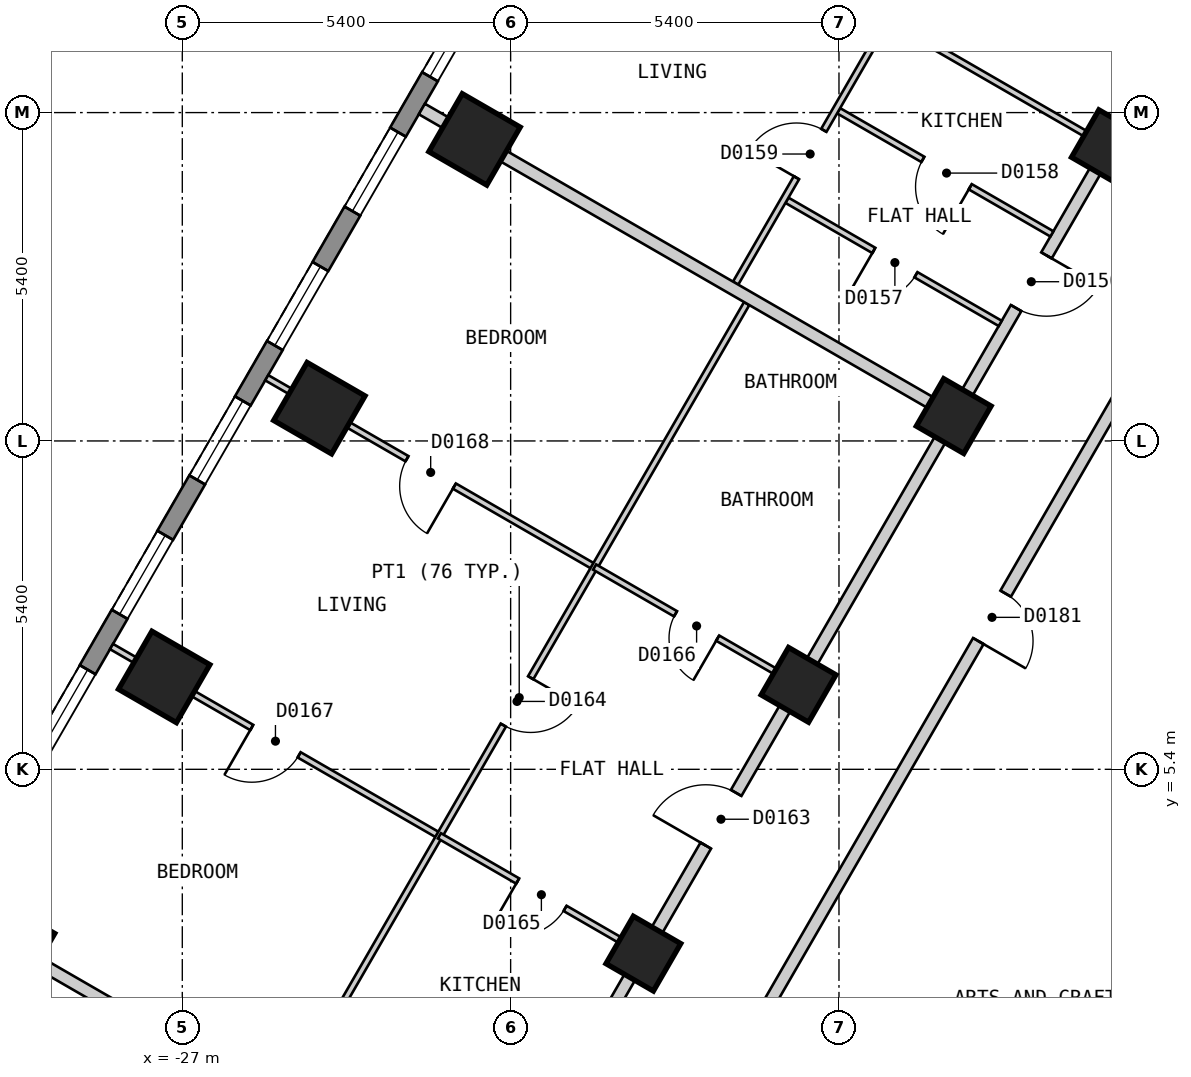
"""IFC4 building model, lengths in metres.
Left out: names, types, materials, properties, quantities, classifications, styles, units other than length and angle.
Written with IfcOpenShell. Run it as: python <this file> out.ifc"""

import sys

from ifc_helpers import new_model, si_unit, direction, frame, frame_2d, origin, origin_2d, place, context, subcontext, project, spatial, polyline, rectangle, outline, extrude, element, fill, save


model = new_model("IFC4")
c1 = context("Model", 3, precision=1e-05, world=origin(), true_north=direction((0.0, 1.0)))
c2 = subcontext(c1, "Body", "Model", "MODEL_VIEW")
j1 = project(units=[si_unit("LENGTHUNIT", "METRE"), si_unit("PLANEANGLEUNIT", "RADIAN")], contexts=[c1])
p1 = place(None, origin())
s1 = spatial("IfcSite", under=j1, at=p1, CompositionType="ELEMENT")
p2 = place(p1, origin())
s2 = spatial("IfcBuilding", under=s1, at=p2, CompositionType="ELEMENT")
p3 = place(p2, frame((0.0, 0.0, 29.4)))
s3 = spatial("IfcBuildingStorey", under=s2, at=p3, CompositionType="ELEMENT", Elevation=29.4)
for number, where, z_axis, x_axis in (
    (1, (-22.194, 15.759, 0.0), (0.0, 0.0, 1.0), (-0.5, -0.866, 0.0)),
    (2, (-24.746, 11.339, 0.0), (0.0, 0.0, 1.0), (-0.5, -0.866, 0.0)),
    (3, (-27.298, 6.919, 0.0), (0.0, 0.0, 1.0), (-0.5, -0.866, 0.0)),
    (4, (-29.849, 2.499, 0.0), (0.0, 0.0, 1.0), (-0.5, -0.866, 0.0)),
):
    element("IfcColumn", number, at=place(p3, frame(where, z_axis=z_axis, x_axis=x_axis)), inside=s3, PredefinedType="COLUMN", context=c2, shape_type="SweptSolid", body=[
        extrude(rectangle(XDim=1.1, YDim=1.1, at=origin_2d()), origin(), (0.0, 0.0, 1.0), 3.0),
    ])
for number, where, z_axis, x_axis in (
    (5, (-11.761, 15.63, 0.0), (0.0, 0.0, 1.0), (-0.5, -0.866, 0.0)),
    (6, (-14.313, 11.209, 0.0), (0.0, 0.0, 1.0), (-0.5, -0.866, 0.0)),
    (7, (-16.865, 6.789, 0.0), (0.0, 0.0, 1.0), (-0.5, -0.866, 0.0)),
    (8, (-19.417, 2.369, 0.0), (0.0, 0.0, 1.0), (-0.5, -0.866, 0.0)),
):
    element("IfcColumn", number, at=place(p3, frame(where, z_axis=z_axis, x_axis=x_axis)), inside=s3, PredefinedType="COLUMN", context=c2, shape_type="SweptSolid", body=[
        extrude(rectangle(XDim=0.9, YDim=0.9, at=origin_2d()), origin(), (0.0, 0.0, 1.0), 3.0),
    ])
p4 = place(p3, frame((-17.71, 25.825, 0.0), z_axis=(0.0, 0.0, 1.0), x_axis=(-0.500001938803, -0.866024284413, 0.0)))
e9 = element("IfcWall", 9, at=p4, inside=s3, PredefinedType="SOLIDWALL", context=c2, shape_type="SweptSolid", body=[
    extrude(outline(polyline([(0.0, -0.15), (27.02, -0.15), (26.94, 0.15), (0.08, 0.15), (0.0, -0.15)])), origin(), (0.0, 0.0, 1.0), 2.7),
])
p5 = place(p4, frame((1.277, 0.0, 0.15)))
e10 = element("IfcOpeningElement", 10, at=p5, cuts=e9, PredefinedType="OPENING", context=c2, shape_type="SweptSolid", body=[
    extrude(rectangle(XDim=1.5, YDim=2.1, at=frame_2d((0.75, 1.05))), frame((0.0, 0.16, 0.0), z_axis=(0.0, -1.0, 0.0), x_axis=(1.0, 0.0, 0.0)), (0.0, 0.0, 1.0), 0.32),
])
p6 = place(p4, frame((3.829, 0.0, 0.15)))
e11 = element("IfcOpeningElement", 11, at=p6, cuts=e9, PredefinedType="OPENING", context=c2, shape_type="SweptSolid", body=[
    extrude(rectangle(XDim=1.5, YDim=2.1, at=frame_2d((0.75, 1.05))), frame((0.0, 0.16, 0.0), z_axis=(0.0, -1.0, 0.0), x_axis=(1.0, 0.0, 0.0)), (0.0, 0.0, 1.0), 0.32),
])
p7 = place(p4, frame((6.382, 0.0, 0.15)))
e12 = element("IfcOpeningElement", 12, at=p7, cuts=e9, PredefinedType="OPENING", context=c2, shape_type="SweptSolid", body=[
    extrude(rectangle(XDim=1.5, YDim=2.1, at=frame_2d((0.75, 1.05))), frame((0.0, 0.16, 0.0), z_axis=(0.0, -1.0, 0.0), x_axis=(1.0, 0.0, 0.0)), (0.0, 0.0, 1.0), 0.32),
])
p8 = place(p4, frame((8.933, 0.0, 0.15)))
e13 = element("IfcOpeningElement", 13, at=p8, cuts=e9, PredefinedType="OPENING", context=c2, shape_type="SweptSolid", body=[
    extrude(rectangle(XDim=1.5, YDim=2.1, at=frame_2d((0.75, 1.05))), frame((0.0, 0.16, 0.0), z_axis=(0.0, -1.0, 0.0), x_axis=(1.0, 0.0, 0.0)), (0.0, 0.0, 1.0), 0.32),
])
p9 = place(p4, frame((11.485, 0.0, 0.15)))
e14 = element("IfcOpeningElement", 14, at=p9, cuts=e9, PredefinedType="OPENING", context=c2, shape_type="SweptSolid", body=[
    extrude(rectangle(XDim=1.5, YDim=2.1, at=frame_2d((0.75, 1.05))), frame((0.0, 0.16, 0.0), z_axis=(0.0, -1.0, 0.0), x_axis=(1.0, 0.0, 0.0)), (0.0, 0.0, 1.0), 0.32),
])
p10 = place(p4, frame((14.037, 0.0, 0.15)))
e15 = element("IfcOpeningElement", 15, at=p10, cuts=e9, PredefinedType="OPENING", context=c2, shape_type="SweptSolid", body=[
    extrude(rectangle(XDim=1.5, YDim=2.1, at=frame_2d((0.75, 1.05))), frame((0.0, 0.16, 0.0), z_axis=(0.0, -1.0, 0.0), x_axis=(1.0, 0.0, 0.0)), (0.0, 0.0, 1.0), 0.32),
])
p11 = place(p4, frame((16.589, 0.0, 0.15)))
e16 = element("IfcOpeningElement", 16, at=p11, cuts=e9, PredefinedType="OPENING", context=c2, shape_type="SweptSolid", body=[
    extrude(rectangle(XDim=1.5, YDim=2.1, at=frame_2d((0.75, 1.05))), frame((0.0, 0.16, 0.0), z_axis=(0.0, -1.0, 0.0), x_axis=(1.0, 0.0, 0.0)), (0.0, 0.0, 1.0), 0.32),
])
p12 = place(p4, frame((19.141, 0.0, 0.15)))
e17 = element("IfcOpeningElement", 17, at=p12, cuts=e9, PredefinedType="OPENING", context=c2, shape_type="SweptSolid", body=[
    extrude(rectangle(XDim=1.5, YDim=2.1, at=frame_2d((0.75, 1.05))), frame((0.0, 0.16, 0.0), z_axis=(0.0, -1.0, 0.0), x_axis=(1.0, 0.0, 0.0)), (0.0, 0.0, 1.0), 0.32),
])
p13 = place(p4, frame((21.693, 0.0, 0.15)))
e18 = element("IfcOpeningElement", 18, at=p13, cuts=e9, PredefinedType="OPENING", context=c2, shape_type="SweptSolid", body=[
    extrude(rectangle(XDim=1.5, YDim=2.1, at=frame_2d((0.75, 1.05))), frame((0.0, 0.16, 0.0), z_axis=(0.0, -1.0, 0.0), x_axis=(1.0, 0.0, 0.0)), (0.0, 0.0, 1.0), 0.32),
])
p14 = place(p4, frame((24.244, 0.0, 0.15)))
e19 = element("IfcOpeningElement", 19, at=p14, cuts=e9, PredefinedType="OPENING", context=c2, shape_type="SweptSolid", body=[
    extrude(rectangle(XDim=1.5, YDim=2.1, at=frame_2d((0.75, 1.05))), frame((0.0, 0.16, 0.0), z_axis=(0.0, -1.0, 0.0), x_axis=(1.0, 0.0, 0.0)), (0.0, 0.0, 1.0), 0.32),
])
p15 = place(p3, frame((-18.244, -0.001, 0.0), z_axis=(0.0, 0.0, 1.0), x_axis=(0.499962999376, 0.866046765051, 0.0)))
e20 = element("IfcWall", 20, at=p15, inside=s3, PredefinedType="PARTITIONING", context=c2, shape_type="SweptSolid", body=[
    extrude(rectangle(XDim=18.245, YDim=0.2, at=frame_2d((9.123, 0.0))), origin(), (0.0, 0.0, 1.0), 2.7),
])
p16 = place(p15, frame((8.672, 0.0, 0.0)))
e21 = element("IfcOpeningElement", 21, at=p16, cuts=e20, PredefinedType="OPENING", context=c2, shape_type="SweptSolid", body=[
    extrude(rectangle(XDim=0.9, YDim=2.1, at=frame_2d((0.45, 1.05))), frame((0.0, 0.11, 0.0), z_axis=(0.0, -1.0, 0.0), x_axis=(1.0, 0.0, 0.0)), (0.0, 0.0, 1.0), 0.22),
])
p17 = place(p3, frame((-20.727, 0.099, 0.0), z_axis=(0.0, 0.0, 1.0), x_axis=(0.499993204491, 0.866029327138, 0.0)))
e22 = element("IfcWall", 22, at=p17, inside=s3, PredefinedType="PARTITIONING", context=c2, shape_type="SweptSolid", body=[
    extrude(rectangle(XDim=20.554, YDim=0.2, at=frame_2d((10.277, 0.0))), origin(), (0.0, 0.0, 1.0), 2.7),
])
p18 = place(p17, frame((14.88, 0.0, 0.0)))
e23 = element("IfcOpeningElement", 23, at=p18, cuts=e22, PredefinedType="OPENING", context=c2, shape_type="SweptSolid", body=[
    extrude(rectangle(XDim=1.0, YDim=2.1, at=frame_2d((0.5, 1.05))), frame((0.0, 0.11, 0.0), z_axis=(0.0, -1.0, 0.0), x_axis=(1.0, 0.0, 0.0)), (0.0, 0.0, 1.0), 0.22),
])
p19 = place(p17, frame((4.673, 0.0, 0.0)))
e24 = element("IfcOpeningElement", 24, at=p19, cuts=e22, PredefinedType="OPENING", context=c2, shape_type="SweptSolid", body=[
    extrude(rectangle(XDim=1.0, YDim=2.1, at=frame_2d((0.5, 1.05))), frame((0.0, 0.11, 0.0), z_axis=(0.0, -1.0, 0.0), x_axis=(1.0, 0.0, 0.0)), (0.0, 0.0, 1.0), 0.22),
])
p20 = place(p3, frame((-28.164, 7.419, 0.0), z_axis=(0.0, 0.0, 1.0), x_axis=(0.86607068519, -0.499921562103, 0.0)))
e25 = element("IfcWall", 25, at=p20, inside=s3, PredefinedType="PARTITIONING", context=c2, shape_type="SweptSolid", body=[
    extrude(rectangle(XDim=6.227, YDim=0.1, at=frame_2d((3.114, 0.0))), origin(), (0.0, 0.0, 1.0), 2.7),
])
p21 = place(p20, frame((2.663, 0.0, 0.0)))
e26 = element("IfcOpeningElement", 26, at=p21, cuts=e25, PredefinedType="OPENING", context=c2, shape_type="SweptSolid", body=[
    extrude(rectangle(XDim=0.9, YDim=2.1, at=frame_2d((0.45, 1.05))), frame((0.0, 0.06, 0.0), z_axis=(0.0, -1.0, 0.0), x_axis=(1.0, 0.0, 0.0)), (0.0, 0.0, 1.0), 0.12),
])
p22 = place(p3, frame((-25.611, 11.839, 0.0), z_axis=(0.0, 0.0, 1.0), x_axis=(0.866031483044, -0.499989470266, 0.0)))
e27 = element("IfcWall", 27, at=p22, inside=s3, PredefinedType="PARTITIONING", context=c2, shape_type="SweptSolid", body=[
    extrude(rectangle(XDim=6.226, YDim=0.1, at=frame_2d((3.113, 0.0))), origin(), (0.0, 0.0, 1.0), 2.7),
])
p23 = place(p22, frame((2.663, 0.0, 0.0)))
e28 = element("IfcOpeningElement", 28, at=p23, cuts=e27, PredefinedType="OPENING", context=c2, shape_type="SweptSolid", body=[
    extrude(rectangle(XDim=0.9, YDim=2.1, at=frame_2d((0.45, 1.05))), frame((0.0, 0.06, 0.0), z_axis=(0.0, -1.0, 0.0), x_axis=(1.0, 0.0, 0.0)), (0.0, 0.0, 1.0), 0.12),
])
p24 = place(p3, frame((-17.056, 14.758, 0.0), z_axis=(0.0, 0.0, 1.0), x_axis=(0.866035025835, -0.499983333749, 0.0)))
e29 = element("IfcWall", 29, at=p24, inside=s3, PredefinedType="PARTITIONING", context=c2, shape_type="SweptSolid", body=[
    extrude(rectangle(XDim=4.051, YDim=0.1, at=frame_2d((2.025, 0.0))), origin(), (0.0, 0.0, 1.0), 2.7),
])
p25 = place(p24, frame((1.65, 0.0, 0.0)))
e30 = element("IfcOpeningElement", 30, at=p25, cuts=e29, PredefinedType="OPENING", context=c2, shape_type="SweptSolid", body=[
    extrude(rectangle(XDim=0.8, YDim=2.1, at=frame_2d((0.4, 1.05))), frame((0.0, 0.06, 0.0), z_axis=(0.0, -1.0, 0.0), x_axis=(1.0, 0.0, 0.0)), (0.0, 0.0, 1.0), 0.12),
])
p26 = place(p3, frame((-16.206, 16.23, 0.0), z_axis=(0.0, 0.0, 1.0), x_axis=(0.866076189179, -0.499912026797, 0.0)))
e31 = element("IfcWall", 31, at=p26, inside=s3, PredefinedType="PARTITIONING", context=c2, shape_type="SweptSolid", body=[
    extrude(rectangle(XDim=4.051, YDim=0.1, at=frame_2d((2.025, 0.0))), origin(), (0.0, 0.0, 1.0), 2.7),
])
p27 = place(p26, frame((1.6, 0.0, 0.0)))
e32 = element("IfcOpeningElement", 32, at=p27, cuts=e31, PredefinedType="OPENING", context=c2, shape_type="SweptSolid", body=[
    extrude(rectangle(XDim=0.9, YDim=2.1, at=frame_2d((0.45, 1.05))), frame((0.0, 0.06, 0.0), z_axis=(0.0, -1.0, 0.0), x_axis=(1.0, 0.0, 0.0)), (0.0, 0.0, 1.0), 0.12),
])
p28 = place(p3, frame((-25.2, 0.099, 0.0), z_axis=(0.0, 0.0, 1.0), x_axis=(0.49997477318, 0.866039968006, 0.0)))
e33 = element("IfcWall", 33, at=p28, inside=s3, PredefinedType="PARTITIONING", context=c2, shape_type="SweptSolid", body=[
    extrude(rectangle(XDim=14.965, YDim=0.1, at=frame_2d((7.482, 0.0))), origin(), (0.0, 0.0, 1.0), 2.7),
])
p29 = place(p28, frame((6.96, 0.0, 0.0)))
e34 = element("IfcOpeningElement", 34, at=p29, cuts=e33, PredefinedType="OPENING", context=c2, shape_type="SweptSolid", body=[
    extrude(rectangle(XDim=0.9, YDim=2.1, at=frame_2d((0.45, 1.05))), frame((0.0, 0.06, 0.0), z_axis=(0.0, -1.0, 0.0), x_axis=(1.0, 0.0, 0.0)), (0.0, 0.0, 1.0), 0.12),
])
p30 = place(p3, frame((-17.9, 13.395, 0.0), z_axis=(0.0, 0.0, 1.0), x_axis=(0.499949632511, 0.866054481515, 0.0)))
e35 = element("IfcWall", 35, at=p30, inside=s3, PredefinedType="PARTITIONING", context=c2, shape_type="SweptSolid", body=[
    extrude(rectangle(XDim=10.109, YDim=0.1, at=frame_2d((5.054, 0.0))), origin(), (0.0, 0.0, 1.0), 2.7),
])
p31 = place(p30, frame((2.002, 0.0, 0.0)))
e36 = element("IfcOpeningElement", 36, at=p31, cuts=e35, PredefinedType="OPENING", context=c2, shape_type="SweptSolid", body=[
    extrude(rectangle(XDim=0.9, YDim=2.1, at=frame_2d((0.45, 1.05))), frame((0.0, 0.06, 0.0), z_axis=(0.0, -1.0, 0.0), x_axis=(1.0, 0.0, 0.0)), (0.0, 0.0, 1.0), 0.12),
])
p32 = place(p30, frame((7.156, 0.0, 0.0)))
e37 = element("IfcOpeningElement", 37, at=p32, cuts=e35, PredefinedType="OPENING", context=c2, shape_type="SweptSolid", body=[
    extrude(rectangle(XDim=0.8, YDim=2.1, at=frame_2d((0.4, 1.05))), frame((0.0, 0.06, 0.0), z_axis=(0.0, -1.0, 0.0), x_axis=(1.0, 0.0, 0.0)), (0.0, 0.0, 1.0), 0.12),
])
p33 = place(p3, frame((-30.716, 2.999, 0.0), z_axis=(0.0, 0.0, 1.0), x_axis=(0.866020924479, -0.500007758305, 0.0)))
e38 = element("IfcWall", 38, at=p33, inside=s3, PredefinedType="PARTITIONING", context=c2, shape_type="SweptSolid", body=[
    extrude(rectangle(XDim=6.0, YDim=0.2, at=frame_2d((3.0, 0.0))), origin(), (0.0, 0.0, 1.0), 2.7),
])
p34 = place(p3, frame((-23.06, 16.259, 0.0), z_axis=(0.0, 0.0, 1.0), x_axis=(0.866047370643, -0.499961950354, 0.0)))
e39 = element("IfcWall", 39, at=p34, inside=s3, PredefinedType="PARTITIONING", context=c2, shape_type="SweptSolid", body=[
    extrude(rectangle(XDim=10.001, YDim=0.2, at=frame_2d((5.0, 0.0))), origin(), (0.0, 0.0, 1.0), 2.7),
])
p35 = place(p3, frame((-22.771, 4.306, 0.0), z_axis=(0.0, 0.0, 1.0), x_axis=(0.866008894869, -0.50002859319, 0.0)))
e40 = element("IfcWall", 40, at=p35, inside=s3, PredefinedType="PARTITIONING", context=c2, shape_type="SweptSolid", body=[
    extrude(rectangle(XDim=3.774, YDim=0.1, at=frame_2d((1.887, 0.0))), origin(), (0.0, 0.0, 1.0), 2.7),
])
p36 = place(p35, frame((1.486, 0.0, 0.0)))
e41 = element("IfcOpeningElement", 41, at=p36, cuts=e40, PredefinedType="OPENING", context=c2, shape_type="SweptSolid", body=[
    extrude(rectangle(XDim=0.9, YDim=2.1, at=frame_2d((0.45, 1.05))), frame((0.0, 0.06, 0.0), z_axis=(0.0, -1.0, 0.0), x_axis=(1.0, 0.0, 0.0)), (0.0, 0.0, 1.0), 0.12),
])
p37 = place(p3, frame((-20.219, 8.726, 0.0), z_axis=(0.0, 0.0, 1.0), x_axis=(0.866008894869, -0.50002859319, 0.0)))
e42 = element("IfcWall", 42, at=p37, inside=s3, PredefinedType="PARTITIONING", context=c2, shape_type="SweptSolid", body=[
    extrude(rectangle(XDim=3.774, YDim=0.1, at=frame_2d((1.887, 0.0))), origin(), (0.0, 0.0, 1.0), 2.7),
])
p38 = place(p37, frame((1.537, 0.0, 0.0)))
e43 = element("IfcOpeningElement", 43, at=p38, cuts=e42, PredefinedType="OPENING", context=c2, shape_type="SweptSolid", body=[
    extrude(rectangle(XDim=0.8, YDim=2.1, at=frame_2d((0.4, 1.05))), frame((0.0, 0.06, 0.0), z_axis=(0.0, -1.0, 0.0), x_axis=(1.0, 0.0, 0.0)), (0.0, 0.0, 1.0), 0.12),
])
p39 = place(p3, frame((-15.398, 17.729, 0.0), z_axis=(0.0, 0.0, 1.0), x_axis=(0.866039832988, -0.499975007054, 0.0)))
e44 = element("IfcWall", 44, at=p39, inside=s3, PredefinedType="PARTITIONING", context=c2, shape_type="SweptSolid", body=[
    extrude(rectangle(XDim=4.1, YDim=0.1, at=frame_2d((2.05, 0.0))), origin(), (0.0, 0.0, 1.0), 2.7),
])
p40 = place(p8, origin())
e45 = element("IfcWindow", 45, at=p40, inside=s3, PartitioningType="SINGLE_PANEL", PredefinedType="WINDOW", context=c2, shape_type="SweptSolid", body=[
    extrude(rectangle(XDim=1.5, YDim=2.1, at=frame_2d((0.75, 1.05))), frame((0.0, 0.03, 0.0), z_axis=(0.0, -1.0, 0.0), x_axis=(1.0, 0.0, 0.0)), (0.0, 0.0, 1.0), 0.06),
])
fill(e13, e45)
p41 = place(p9, origin())
e46 = element("IfcWindow", 46, at=p41, inside=s3, PartitioningType="SINGLE_PANEL", PredefinedType="WINDOW", context=c2, shape_type="SweptSolid", body=[
    extrude(rectangle(XDim=1.5, YDim=2.1, at=frame_2d((0.75, 1.05))), frame((0.0, 0.03, 0.0), z_axis=(0.0, -1.0, 0.0), x_axis=(1.0, 0.0, 0.0)), (0.0, 0.0, 1.0), 0.06),
])
fill(e14, e46)
p42 = place(p10, origin())
e47 = element("IfcWindow", 47, at=p42, inside=s3, PartitioningType="SINGLE_PANEL", PredefinedType="WINDOW", context=c2, shape_type="SweptSolid", body=[
    extrude(rectangle(XDim=1.5, YDim=2.1, at=frame_2d((0.75, 1.05))), frame((0.0, 0.03, 0.0), z_axis=(0.0, -1.0, 0.0), x_axis=(1.0, 0.0, 0.0)), (0.0, 0.0, 1.0), 0.06),
])
fill(e15, e47)
p43 = place(p11, origin())
e48 = element("IfcWindow", 48, at=p43, inside=s3, PartitioningType="SINGLE_PANEL", PredefinedType="WINDOW", context=c2, shape_type="SweptSolid", body=[
    extrude(rectangle(XDim=1.5, YDim=2.1, at=frame_2d((0.75, 1.05))), frame((0.0, 0.03, 0.0), z_axis=(0.0, -1.0, 0.0), x_axis=(1.0, 0.0, 0.0)), (0.0, 0.0, 1.0), 0.06),
])
fill(e16, e48)
p44 = place(p12, origin())
e49 = element("IfcWindow", 49, at=p44, inside=s3, PartitioningType="SINGLE_PANEL", PredefinedType="WINDOW", context=c2, shape_type="SweptSolid", body=[
    extrude(rectangle(XDim=1.5, YDim=2.1, at=frame_2d((0.75, 1.05))), frame((0.0, 0.03, 0.0), z_axis=(0.0, -1.0, 0.0), x_axis=(1.0, 0.0, 0.0)), (0.0, 0.0, 1.0), 0.06),
])
fill(e17, e49)
p45 = place(p13, origin())
e50 = element("IfcWindow", 50, at=p45, inside=s3, PartitioningType="SINGLE_PANEL", PredefinedType="WINDOW", context=c2, shape_type="SweptSolid", body=[
    extrude(rectangle(XDim=1.5, YDim=2.1, at=frame_2d((0.75, 1.05))), frame((0.0, 0.03, 0.0), z_axis=(0.0, -1.0, 0.0), x_axis=(1.0, 0.0, 0.0)), (0.0, 0.0, 1.0), 0.06),
])
fill(e18, e50)
p46 = place(p18, origin())
e51 = element("IfcDoor", 51, at=p46, inside=s3, OperationType="SINGLE_SWING_RIGHT", PredefinedType="DOOR", context=c2, shape_type="SweptSolid", body=[
    extrude(rectangle(XDim=1.0, YDim=2.1, at=frame_2d((0.5, 1.05))), frame((0.0, 0.025, 0.0), z_axis=(0.0, -1.0, 0.0), x_axis=(1.0, 0.0, 0.0)), (0.0, 0.0, 1.0), 0.05),
])
fill(e23, e51)
p47 = place(p25, origin())
e52 = element("IfcDoor", 52, at=p47, inside=s3, OperationType="SINGLE_SWING_LEFT", PredefinedType="DOOR", context=c2, shape_type="SweptSolid", body=[
    extrude(rectangle(XDim=0.8, YDim=2.1, at=frame_2d((0.4, 1.05))), frame((0.0, 0.025, 0.0), z_axis=(0.0, -1.0, 0.0), x_axis=(1.0, 0.0, 0.0)), (0.0, 0.0, 1.0), 0.05),
])
fill(e30, e52)
p48 = place(p27, origin())
e53 = element("IfcDoor", 53, at=p48, inside=s3, OperationType="SINGLE_SWING_RIGHT", PredefinedType="DOOR", context=c2, shape_type="SweptSolid", body=[
    extrude(rectangle(XDim=0.9, YDim=2.1, at=frame_2d((0.45, 1.05))), frame((0.0, 0.025, 0.0), z_axis=(0.0, -1.0, 0.0), x_axis=(1.0, 0.0, 0.0)), (0.0, 0.0, 1.0), 0.05),
])
fill(e32, e53)
p49 = place(p31, origin())
e54 = element("IfcDoor", 54, at=p49, inside=s3, OperationType="SINGLE_SWING_LEFT", PredefinedType="DOOR", context=c2, shape_type="SweptSolid", body=[
    extrude(rectangle(XDim=0.9, YDim=2.1, at=frame_2d((0.45, 1.05))), frame((0.0, 0.025, 0.0), z_axis=(0.0, -1.0, 0.0), x_axis=(1.0, 0.0, 0.0)), (0.0, 0.0, 1.0), 0.05),
])
fill(e36, e54)
p50 = place(p19, origin())
e55 = element("IfcDoor", 55, at=p50, inside=s3, OperationType="SINGLE_SWING_LEFT", PredefinedType="DOOR", context=c2, shape_type="SweptSolid", body=[
    extrude(rectangle(XDim=1.0, YDim=2.1, at=frame_2d((0.5, 1.05))), frame((0.0, 0.025, 0.0), z_axis=(0.0, -1.0, 0.0), x_axis=(1.0, 0.0, 0.0)), (0.0, 0.0, 1.0), 0.05),
])
fill(e24, e55)
p51 = place(p29, origin())
e56 = element("IfcDoor", 56, at=p51, inside=s3, OperationType="SINGLE_SWING_RIGHT", PredefinedType="DOOR", context=c2, shape_type="SweptSolid", body=[
    extrude(rectangle(XDim=0.9, YDim=2.1, at=frame_2d((0.45, 1.05))), frame((0.0, 0.025, 0.0), z_axis=(0.0, -1.0, 0.0), x_axis=(1.0, 0.0, 0.0)), (0.0, 0.0, 1.0), 0.05),
])
fill(e34, e56)
p52 = place(p36, origin())
e57 = element("IfcDoor", 57, at=p52, inside=s3, OperationType="SINGLE_SWING_LEFT", PredefinedType="DOOR", context=c2, shape_type="SweptSolid", body=[
    extrude(rectangle(XDim=0.9, YDim=2.1, at=frame_2d((0.45, 1.05))), frame((0.0, 0.025, 0.0), z_axis=(0.0, -1.0, 0.0), x_axis=(1.0, 0.0, 0.0)), (0.0, 0.0, 1.0), 0.05),
])
fill(e41, e57)
p53 = place(p38, origin())
e58 = element("IfcDoor", 58, at=p53, inside=s3, OperationType="SINGLE_SWING_RIGHT", PredefinedType="DOOR", context=c2, shape_type="SweptSolid", body=[
    extrude(rectangle(XDim=0.8, YDim=2.1, at=frame_2d((0.4, 1.05))), frame((0.0, 0.025, 0.0), z_axis=(0.0, -1.0, 0.0), x_axis=(1.0, 0.0, 0.0)), (0.0, 0.0, 1.0), 0.05),
])
fill(e43, e58)
p54 = place(p21, origin())
e59 = element("IfcDoor", 59, at=p54, inside=s3, OperationType="SINGLE_SWING_LEFT", PredefinedType="DOOR", context=c2, shape_type="SweptSolid", body=[
    extrude(rectangle(XDim=0.9, YDim=2.1, at=frame_2d((0.45, 1.05))), frame((0.0, 0.025, 0.0), z_axis=(0.0, -1.0, 0.0), x_axis=(1.0, 0.0, 0.0)), (0.0, 0.0, 1.0), 0.05),
])
fill(e26, e59)
p55 = place(p23, origin())
e60 = element("IfcDoor", 60, at=p55, inside=s3, OperationType="SINGLE_SWING_RIGHT", PredefinedType="DOOR", context=c2, shape_type="SweptSolid", body=[
    extrude(rectangle(XDim=0.9, YDim=2.1, at=frame_2d((0.45, 1.05))), frame((0.0, 0.025, 0.0), z_axis=(0.0, -1.0, 0.0), x_axis=(1.0, 0.0, 0.0)), (0.0, 0.0, 1.0), 0.05),
])
fill(e28, e60)
p56 = place(p16, origin())
e61 = element("IfcDoor", 61, at=p56, inside=s3, OperationType="SINGLE_SWING_LEFT", PredefinedType="DOOR", context=c2, shape_type="SweptSolid", body=[
    extrude(rectangle(XDim=0.9, YDim=2.1, at=frame_2d((0.45, 1.05))), frame((0.0, 0.025, 0.0), z_axis=(0.0, -1.0, 0.0), x_axis=(1.0, 0.0, 0.0)), (0.0, 0.0, 1.0), 0.05),
])
fill(e21, e61)
save(model, sys.argv[1])
